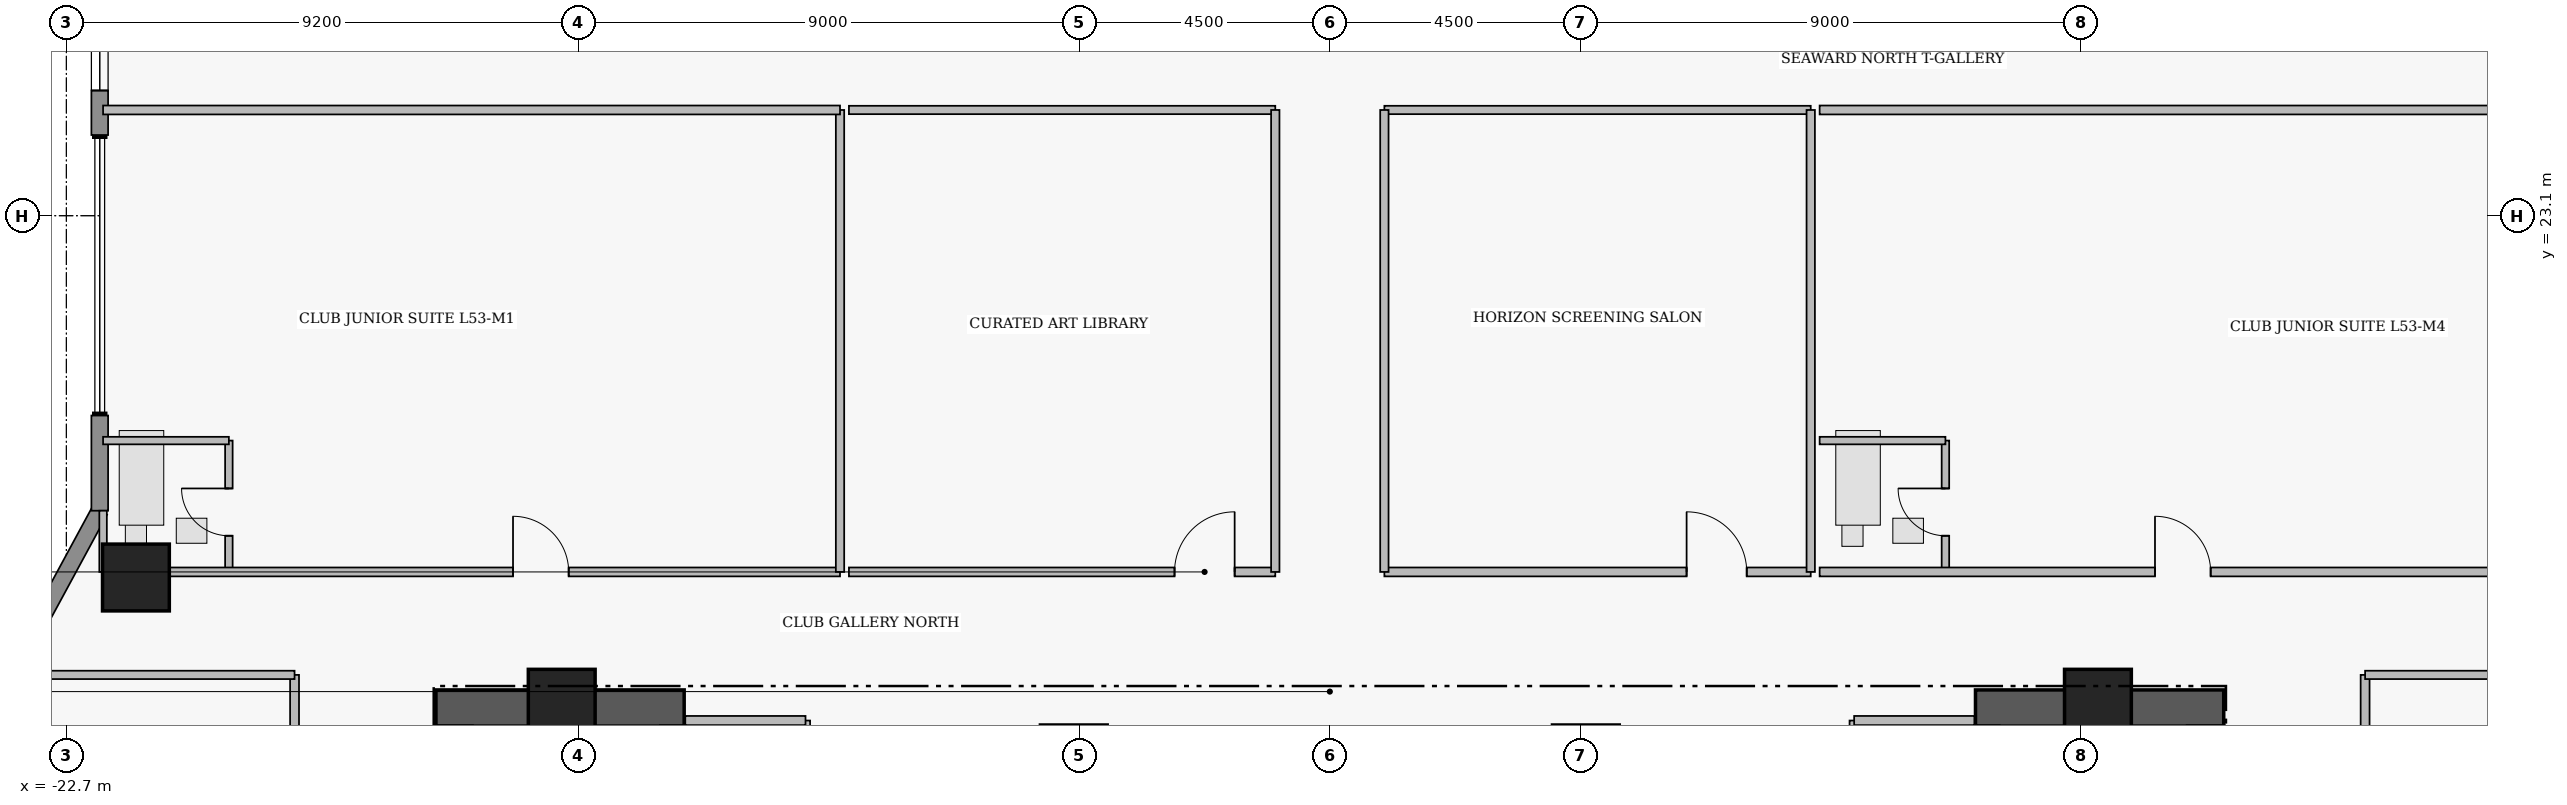
"""IFC4 building model, lengths in metres.
Left out: names, types, materials, properties, quantities, classifications, styles, units other than length and angle.
Written with IfcOpenShell. Run it as: python <this file> out.ifc"""

import sys

from ifc_helpers import new_model, si_unit, direction, frame, frame_2d, origin, origin_2d, place, context, subcontext, project, spatial, rectangle, extrude, element, fill, save


model = new_model("IFC4")
c1 = context("Model", 3, precision=1e-05, world=origin(), true_north=direction((0.0, 1.0)))
c2 = subcontext(c1, "Body", "Model", "MODEL_VIEW")
j1 = project(units=[si_unit("LENGTHUNIT", "METRE"), si_unit("PLANEANGLEUNIT", "RADIAN")], contexts=[c1])
p1 = place(None, origin())
s1 = spatial("IfcSite", under=j1, at=p1, CompositionType="ELEMENT")
p2 = place(p1, origin())
s2 = spatial("IfcBuilding", under=s1, at=p2, CompositionType="ELEMENT")
p3 = place(p2, frame((0.0, 0.0, 211.15)))
s3 = spatial("IfcBuildingStorey", under=s2, at=p3, CompositionType="ELEMENT", Elevation=211.15)
for number, where, z_axis, x_axis in (
    (1, (-16.06, 14.255, 0.0), (0.0, 0.0, 1.0), (1.0, 0.0, 0.0)),
    (2, (11.6, 14.255, 0.0), (0.0, 0.0, 1.0), (1.0, 0.0, 0.0)),
):
    element("IfcWall", number, at=place(p3, frame(where, z_axis=z_axis, x_axis=x_axis)), inside=s3, PredefinedType="SHEAR", context=c2, shape_type="SweptSolid", body=[
        extrude(rectangle(XDim=4.46, YDim=0.65, at=frame_2d((2.23, 0.0))), origin(), (0.0, 0.0, 1.0), 3.56),
    ])
for number, where, z_axis, x_axis in (
    (3, (-13.8, 14.35, 0.0), (0.0, 0.0, 1.0), (1.0, 0.0, 0.0)),
    (4, (-4.6, 13.35, 0.0), (0.0, 0.0, 1.0), (1.0, 0.0, 0.0)),
    (5, (4.6, 13.35, 0.0), (0.0, 0.0, 1.0), (1.0, 0.0, 0.0)),
    (6, (13.8, 14.35, 0.0), (0.0, 0.0, 1.0), (1.0, 0.0, 0.0)),
    (7, (-21.45, 16.6, 0.0), (0.0, 0.0, 1.0), (1.0, 0.0, 0.0)),
):
    element("IfcColumn", number, at=place(p3, frame(where, z_axis=z_axis, x_axis=x_axis)), inside=s3, PredefinedType="COLUMN", context=c2, shape_type="SweptSolid", body=[
        extrude(rectangle(XDim=1.2, YDim=1.2, at=origin_2d()), origin(), (0.0, 0.0, 1.0), 3.75),
    ])
p4 = place(p3, frame((-24.7, 13.0, 0.0), z_axis=(0.0, 0.0, 1.0), x_axis=(0.476258655584, 0.879305233114, 0.0)))
e8 = element("IfcWall", 8, at=p4, inside=s3, PredefinedType="STANDARD", context=c2, shape_type="SweptSolid", body=[
    extrude(rectangle(XDim=5.459, YDim=0.3, at=frame_2d((2.729, 0.0))), origin(), (0.0, 0.0, 1.0), 3.53),
])
p5 = place(p3, frame((-22.1, 17.8, 0.0), z_axis=(0.0, 0.0, 1.0), x_axis=(0.0, 1.0, 0.0)))
e9 = element("IfcWall", 9, at=p5, inside=s3, PredefinedType="STANDARD", context=c2, shape_type="SweptSolid", body=[
    extrude(rectangle(XDim=1.71, YDim=0.3, at=frame_2d((0.855, 0.0))), origin(), (0.0, 0.0, 1.0), 3.53),
])
p6 = place(p3, frame((-22.1, 24.55, 0.0), z_axis=(0.0, 0.0, 1.0), x_axis=(0.0, 1.0, 0.0)))
e10 = element("IfcWall", 10, at=p6, inside=s3, PredefinedType="STANDARD", context=c2, shape_type="SweptSolid", body=[
    extrude(rectangle(XDim=5.65, YDim=0.3, at=frame_2d((2.825, 0.0))), origin(), (0.0, 0.0, 1.0), 3.53),
])
p7 = place(p6, frame((0.8, 0.0, 0.95)))
e11 = element("IfcOpeningElement", 11, at=p7, cuts=e10, PredefinedType="OPENING", context=c2, shape_type="SweptSolid", body=[
    extrude(rectangle(XDim=1.15, YDim=1.55, at=frame_2d((0.575, 0.775))), frame((0.0, 0.16, 0.0), z_axis=(0.0, -1.0, 0.0), x_axis=(1.0, 0.0, 0.0)), (0.0, 0.0, 1.0), 0.32),
])
p8 = place(p6, frame((2.905, 0.0, 0.95)))
e12 = element("IfcOpeningElement", 12, at=p8, cuts=e10, PredefinedType="OPENING", context=c2, shape_type="SweptSolid", body=[
    extrude(rectangle(XDim=1.15, YDim=1.55, at=frame_2d((0.575, 0.775))), frame((0.0, 0.16, 0.0), z_axis=(0.0, -1.0, 0.0), x_axis=(1.0, 0.0, 0.0)), (0.0, 0.0, 1.0), 0.32),
])
p9 = place(p3, frame((-19.78, 16.7, 0.0), z_axis=(0.0, 0.0, 1.0), x_axis=(0.0, 1.0, 0.0)))
e13 = element("IfcWall", 13, at=p9, inside=s3, PredefinedType="PLUMBINGWALL", context=c2, shape_type="SweptSolid", body=[
    extrude(rectangle(XDim=2.36, YDim=0.135, at=frame_2d((1.18, 0.0))), origin(), (0.0, 0.0, 1.0), 3.53),
])
p10 = place(p9, frame((0.65, 0.0, 0.0)))
e14 = element("IfcOpeningElement", 14, at=p10, cuts=e13, PredefinedType="OPENING", context=c2, shape_type="SweptSolid", body=[
    extrude(rectangle(XDim=0.85, YDim=2.1, at=frame_2d((0.425, 1.05))), frame((0.0, 0.077, 0.0), z_axis=(0.0, -1.0, 0.0), x_axis=(1.0, 0.0, 0.0)), (0.0, 0.0, 1.0), 0.155),
])
p11 = place(p3, frame((-22.04, 16.7, 0.0), z_axis=(0.0, 0.0, 1.0), x_axis=(1.0, 0.0, 0.0)))
e15 = element("IfcWall", 15, at=p11, inside=s3, PredefinedType="PARTITIONING", context=c2, shape_type="SweptSolid", body=[
    extrude(rectangle(XDim=13.24, YDim=0.16, at=frame_2d((6.62, 0.0))), origin(), (0.0, 0.0, 1.0), 3.124),
])
p12 = place(p11, frame((7.365, 0.0, 0.0)))
e16 = element("IfcOpeningElement", 16, at=p12, cuts=e15, PredefinedType="OPENING", context=c2, shape_type="SweptSolid", body=[
    extrude(rectangle(XDim=1.0, YDim=2.15, at=frame_2d((0.5, 1.075))), frame((0.0, 0.09, 0.0), z_axis=(0.0, -1.0, 0.0), x_axis=(1.0, 0.0, 0.0)), (0.0, 0.0, 1.0), 0.18),
])
p13 = place(p3, frame((-8.64, 16.7, 0.0), z_axis=(0.0, 0.0, 1.0), x_axis=(1.0, 0.0, 0.0)))
e17 = element("IfcWall", 17, at=p13, inside=s3, PredefinedType="PARTITIONING", context=c2, shape_type="SweptSolid", body=[
    extrude(rectangle(XDim=7.66, YDim=0.16, at=frame_2d((3.83, 0.0))), origin(), (0.0, 0.0, 1.0), 3.124),
])
p14 = place(p13, frame((5.85, 0.0, 0.0)))
e18 = element("IfcOpeningElement", 18, at=p14, cuts=e17, PredefinedType="OPENING", context=c2, shape_type="SweptSolid", body=[
    extrude(rectangle(XDim=1.08, YDim=2.18, at=frame_2d((0.54, 1.09))), frame((0.0, 0.09, 0.0), z_axis=(0.0, -1.0, 0.0), x_axis=(1.0, 0.0, 0.0)), (0.0, 0.0, 1.0), 0.18),
])
p15 = place(p3, frame((0.98, 16.7, 0.0), z_axis=(0.0, 0.0, 1.0), x_axis=(1.0, 0.0, 0.0)))
e19 = element("IfcWall", 19, at=p15, inside=s3, PredefinedType="PARTITIONING", context=c2, shape_type="SweptSolid", body=[
    extrude(rectangle(XDim=7.66, YDim=0.16, at=frame_2d((3.83, 0.0))), origin(), (0.0, 0.0, 1.0), 3.124),
])
p16 = place(p15, frame((5.43, 0.0, 0.0)))
e20 = element("IfcOpeningElement", 20, at=p16, cuts=e19, PredefinedType="OPENING", context=c2, shape_type="SweptSolid", body=[
    extrude(rectangle(XDim=1.08, YDim=2.18, at=frame_2d((0.54, 1.09))), frame((0.0, 0.09, 0.0), z_axis=(0.0, -1.0, 0.0), x_axis=(1.0, 0.0, 0.0)), (0.0, 0.0, 1.0), 0.18),
])
p17 = place(p3, frame((11.06, 16.7, 0.0), z_axis=(0.0, 0.0, 1.0), x_axis=(0.0, 1.0, 0.0)))
e21 = element("IfcWall", 21, at=p17, inside=s3, PredefinedType="PLUMBINGWALL", context=c2, shape_type="SweptSolid", body=[
    extrude(rectangle(XDim=2.36, YDim=0.135, at=frame_2d((1.18, 0.0))), origin(), (0.0, 0.0, 1.0), 3.53),
])
p18 = place(p17, frame((0.65, 0.0, 0.0)))
e22 = element("IfcOpeningElement", 22, at=p18, cuts=e21, PredefinedType="OPENING", context=c2, shape_type="SweptSolid", body=[
    extrude(rectangle(XDim=0.85, YDim=2.1, at=frame_2d((0.425, 1.05))), frame((0.0, 0.077, 0.0), z_axis=(0.0, -1.0, 0.0), x_axis=(1.0, 0.0, 0.0)), (0.0, 0.0, 1.0), 0.155),
])
p19 = place(p3, frame((8.8, 16.7, 0.0), z_axis=(0.0, 0.0, 1.0), x_axis=(1.0, 0.0, 0.0)))
e23 = element("IfcWall", 23, at=p19, inside=s3, PredefinedType="PARTITIONING", context=c2, shape_type="SweptSolid", body=[
    extrude(rectangle(XDim=13.24, YDim=0.16, at=frame_2d((6.62, 0.0))), origin(), (0.0, 0.0, 1.0), 3.124),
])
p20 = place(p19, frame((6.025, 0.0, 0.0)))
e24 = element("IfcOpeningElement", 24, at=p20, cuts=e23, PredefinedType="OPENING", context=c2, shape_type="SweptSolid", body=[
    extrude(rectangle(XDim=1.0, YDim=2.15, at=frame_2d((0.5, 1.075))), frame((0.0, 0.09, 0.0), z_axis=(0.0, -1.0, 0.0), x_axis=(1.0, 0.0, 0.0)), (0.0, 0.0, 1.0), 0.18),
])
p21 = place(p3, frame((18.6, 6.91, 0.0), z_axis=(0.0, 0.0, 1.0), x_axis=(0.0, 1.0, 0.0)))
e25 = element("IfcWall", 25, at=p21, inside=s3, PredefinedType="PARTITIONING", context=c2, shape_type="SweptSolid", body=[
    extrude(rectangle(XDim=7.94, YDim=0.16, at=frame_2d((3.97, 0.0))), origin(), (0.0, 0.0, 1.0), 3.53),
])
p22 = place(p21, frame((3.51, 0.0, 0.0)))
e26 = element("IfcOpeningElement", 26, at=p22, cuts=e25, PredefinedType="OPENING", context=c2, shape_type="SweptSolid", body=[
    extrude(rectangle(XDim=0.92, YDim=2.12, at=frame_2d((0.46, 1.06))), frame((0.0, 0.09, 0.0), z_axis=(0.0, -1.0, 0.0), x_axis=(1.0, 0.0, 0.0)), (0.0, 0.0, 1.0), 0.18),
])
p23 = place(p3, frame((-18.6, 1.55, 0.0), z_axis=(0.0, 0.0, 1.0), x_axis=(0.0, 1.0, 0.0)))
e27 = element("IfcWall", 27, at=p23, inside=s3, PredefinedType="PARTITIONING", context=c2, shape_type="SweptSolid", body=[
    extrude(rectangle(XDim=13.3, YDim=0.16, at=frame_2d((6.65, 0.0))), origin(), (0.0, 0.0, 1.0), 3.53),
])
p24 = place(p23, frame((6.175, 0.0, 0.0)))
e28 = element("IfcOpeningElement", 28, at=p24, cuts=e27, PredefinedType="OPENING", context=c2, shape_type="SweptSolid", body=[
    extrude(rectangle(XDim=0.95, YDim=2.15, at=frame_2d((0.475, 1.075))), frame((0.0, 0.09, 0.0), z_axis=(0.0, -1.0, 0.0), x_axis=(1.0, 0.0, 0.0)), (0.0, 0.0, 1.0), 0.18),
])
p25 = place(p3, frame((-9.42, 11.07, 0.0), z_axis=(0.0, 0.0, 1.0), x_axis=(0.0, 1.0, 0.0)))
e29 = element("IfcWall", 29, at=p25, inside=s3, PredefinedType="PARTITIONING", context=c2, shape_type="SweptSolid", body=[
    extrude(rectangle(XDim=2.96, YDim=0.165, at=frame_2d((1.48, 0.0))), origin(), (0.0, 0.0, 1.0), 3.53),
])
p26 = place(p3, frame((-11.58, 14.03, 0.0), z_axis=(0.0, 0.0, 1.0), x_axis=(1.0, 0.0, 0.0)))
e30 = element("IfcWall", 30, at=p26, inside=s3, PredefinedType="PARTITIONING", context=c2, shape_type="SweptSolid", body=[
    extrude(rectangle(XDim=2.16, YDim=0.165, at=frame_2d((1.08, 0.0))), origin(), (0.0, 0.0, 1.0), 3.53),
])
p27 = place(p3, frame((9.42, 11.07, 0.0), z_axis=(0.0, 0.0, 1.0), x_axis=(0.0, 1.0, 0.0)))
e31 = element("IfcWall", 31, at=p27, inside=s3, PredefinedType="PARTITIONING", context=c2, shape_type="SweptSolid", body=[
    extrude(rectangle(XDim=2.96, YDim=0.165, at=frame_2d((1.48, 0.0))), origin(), (0.0, 0.0, 1.0), 3.53),
])
p28 = place(p3, frame((9.42, 14.03, 0.0), z_axis=(0.0, 0.0, 1.0), x_axis=(1.0, 0.0, 0.0)))
e32 = element("IfcWall", 32, at=p28, inside=s3, PredefinedType="PARTITIONING", context=c2, shape_type="SweptSolid", body=[
    extrude(rectangle(XDim=2.16, YDim=0.165, at=frame_2d((1.08, 0.0))), origin(), (0.0, 0.0, 1.0), 3.53),
])
p29 = place(p3, frame((-22.04, 19.06, 0.0), z_axis=(0.0, 0.0, 1.0), x_axis=(1.0, 0.0, 0.0)))
e33 = element("IfcWall", 33, at=p29, inside=s3, PredefinedType="PLUMBINGWALL", context=c2, shape_type="SweptSolid", body=[
    extrude(rectangle(XDim=2.26, YDim=0.135, at=frame_2d((1.13, 0.0))), origin(), (0.0, 0.0, 1.0), 3.53),
])
p30 = place(p3, frame((-22.04, 16.7, 0.0), z_axis=(0.0, 0.0, 1.0), x_axis=(0.0, 1.0, 0.0)))
e34 = element("IfcWall", 34, at=p30, inside=s3, PredefinedType="PLUMBINGWALL", context=c2, shape_type="SweptSolid", body=[
    extrude(rectangle(XDim=1.1, YDim=0.135, at=frame_2d((0.55, 0.0))), origin(), (0.0, 0.0, 1.0), 3.53),
])
p31 = place(p3, frame((-8.8, 16.7, 0.0), z_axis=(0.0, 0.0, 1.0), x_axis=(0.0, 1.0, 0.0)))
e35 = element("IfcWall", 35, at=p31, inside=s3, PredefinedType="PARTITIONING", context=c2, shape_type="SweptSolid", body=[
    extrude(rectangle(XDim=8.3, YDim=0.15, at=frame_2d((4.15, 0.0))), origin(), (0.0, 0.0, 1.0), 3.53),
])
p32 = place(p3, frame((-22.04, 25.0, 0.0), z_axis=(0.0, 0.0, 1.0), x_axis=(1.0, 0.0, 0.0)))
e36 = element("IfcWall", 36, at=p32, inside=s3, PredefinedType="PARTITIONING", context=c2, shape_type="SweptSolid", body=[
    extrude(rectangle(XDim=13.24, YDim=0.16, at=frame_2d((6.62, 0.0))), origin(), (0.0, 0.0, 1.0), 3.124),
])
p33 = place(p3, frame((-8.64, 25.0, 0.0), z_axis=(0.0, 0.0, 1.0), x_axis=(1.0, 0.0, 0.0)))
e37 = element("IfcWall", 37, at=p33, inside=s3, PredefinedType="PARTITIONING", context=c2, shape_type="SweptSolid", body=[
    extrude(rectangle(XDim=7.66, YDim=0.15, at=frame_2d((3.83, 0.0))), origin(), (0.0, 0.0, 1.0), 3.124),
])
p34 = place(p3, frame((-0.98, 16.7, 0.0), z_axis=(0.0, 0.0, 1.0), x_axis=(0.0, 1.0, 0.0)))
e38 = element("IfcWall", 38, at=p34, inside=s3, PredefinedType="PARTITIONING", context=c2, shape_type="SweptSolid", body=[
    extrude(rectangle(XDim=8.3, YDim=0.15, at=frame_2d((4.15, 0.0))), origin(), (0.0, 0.0, 1.0), 3.53),
])
p35 = place(p3, frame((0.98, 25.0, 0.0), z_axis=(0.0, 0.0, 1.0), x_axis=(1.0, 0.0, 0.0)))
e39 = element("IfcWall", 39, at=p35, inside=s3, PredefinedType="PARTITIONING", context=c2, shape_type="SweptSolid", body=[
    extrude(rectangle(XDim=7.66, YDim=0.15, at=frame_2d((3.83, 0.0))), origin(), (0.0, 0.0, 1.0), 3.124),
])
for number, where, z_axis, x_axis in (
    (40, (0.98, 16.7, 0.0), (0.0, 0.0, 1.0), (0.0, 1.0, 0.0)),
    (41, (8.64, 16.7, 0.0), (0.0, 0.0, 1.0), (0.0, 1.0, 0.0)),
):
    element("IfcWall", number, at=place(p3, frame(where, z_axis=z_axis, x_axis=x_axis)), inside=s3, PredefinedType="PARTITIONING", context=c2, shape_type="SweptSolid", body=[
        extrude(rectangle(XDim=8.3, YDim=0.15, at=frame_2d((4.15, 0.0))), origin(), (0.0, 0.0, 1.0), 3.53),
    ])
p36 = place(p3, frame((8.8, 19.06, 0.0), z_axis=(0.0, 0.0, 1.0), x_axis=(1.0, 0.0, 0.0)))
e42 = element("IfcWall", 42, at=p36, inside=s3, PredefinedType="PLUMBINGWALL", context=c2, shape_type="SweptSolid", body=[
    extrude(rectangle(XDim=2.26, YDim=0.135, at=frame_2d((1.13, 0.0))), origin(), (0.0, 0.0, 1.0), 3.124),
])
p37 = place(p3, frame((8.8, 25.0, 0.0), z_axis=(0.0, 0.0, 1.0), x_axis=(1.0, 0.0, 0.0)))
e43 = element("IfcWall", 43, at=p37, inside=s3, PredefinedType="PARTITIONING", context=c2, shape_type="SweptSolid", body=[
    extrude(rectangle(XDim=13.24, YDim=0.16, at=frame_2d((6.62, 0.0))), origin(), (0.0, 0.0, 1.0), 3.124),
])
for number, where, z_axis, x_axis in (
    (44, (18.6, 14.85, 0.0), (0.0, 0.0, 1.0), (1.0, 0.0, 0.0)),
    (45, (-23.638, 14.85, 0.0), (0.0, 0.0, 1.0), (1.0, 0.0, 0.0)),
):
    element("IfcWall", number, at=place(p3, frame(where, z_axis=z_axis, x_axis=x_axis)), inside=s3, PredefinedType="PARTITIONING", context=c2, shape_type="SweptSolid", body=[
        extrude(rectangle(XDim=5.038, YDim=0.15, at=frame_2d((2.519, 0.0))), origin(), (0.0, 0.0, 1.0), 3.53),
    ])
p38 = place(p7, origin())
e46 = element("IfcWindow", 46, at=p38, inside=s3, PartitioningType="SINGLE_PANEL", PredefinedType="WINDOW", context=c2, shape_type="SweptSolid", body=[
    extrude(rectangle(XDim=1.15, YDim=1.55, at=frame_2d((0.575, 0.775))), frame((0.0, 0.03, 0.0), z_axis=(0.0, -1.0, 0.0), x_axis=(1.0, 0.0, 0.0)), (0.0, 0.0, 1.0), 0.06),
])
fill(e11, e46)
p39 = place(p10, origin())
e47 = element("IfcDoor", 47, at=p39, inside=s3, OperationType="SINGLE_SWING_RIGHT", PredefinedType="DOOR", context=c2, shape_type="SweptSolid", body=[
    extrude(rectangle(XDim=0.85, YDim=2.1, at=frame_2d((0.425, 1.05))), frame((0.0, 0.025, 0.0), z_axis=(0.0, -1.0, 0.0), x_axis=(1.0, 0.0, 0.0)), (0.0, 0.0, 1.0), 0.05),
])
fill(e14, e47)
p40 = place(p12, origin())
e48 = element("IfcDoor", 48, at=p40, inside=s3, OperationType="SINGLE_SWING_LEFT", PredefinedType="DOOR", context=c2, shape_type="SweptSolid", body=[
    extrude(rectangle(XDim=1.0, YDim=2.15, at=frame_2d((0.5, 1.075))), frame((0.0, 0.025, 0.0), z_axis=(0.0, -1.0, 0.0), x_axis=(1.0, 0.0, 0.0)), (0.0, 0.0, 1.0), 0.05),
])
fill(e16, e48)
p41 = place(p14, origin())
e49 = element("IfcDoor", 49, at=p41, inside=s3, OperationType="SINGLE_SWING_RIGHT", PredefinedType="DOOR", context=c2, shape_type="SweptSolid", body=[
    extrude(rectangle(XDim=1.08, YDim=2.18, at=frame_2d((0.54, 1.09))), frame((0.0, 0.025, 0.0), z_axis=(0.0, -1.0, 0.0), x_axis=(1.0, 0.0, 0.0)), (0.0, 0.0, 1.0), 0.05),
])
fill(e18, e49)
p42 = place(p16, origin())
e50 = element("IfcDoor", 50, at=p42, inside=s3, OperationType="SINGLE_SWING_LEFT", PredefinedType="DOOR", context=c2, shape_type="SweptSolid", body=[
    extrude(rectangle(XDim=1.08, YDim=2.18, at=frame_2d((0.54, 1.09))), frame((0.0, 0.025, 0.0), z_axis=(0.0, -1.0, 0.0), x_axis=(1.0, 0.0, 0.0)), (0.0, 0.0, 1.0), 0.05),
])
fill(e20, e50)
p43 = place(p18, origin())
e51 = element("IfcDoor", 51, at=p43, inside=s3, OperationType="SINGLE_SWING_RIGHT", PredefinedType="DOOR", context=c2, shape_type="SweptSolid", body=[
    extrude(rectangle(XDim=0.85, YDim=2.1, at=frame_2d((0.425, 1.05))), frame((0.0, 0.025, 0.0), z_axis=(0.0, -1.0, 0.0), x_axis=(1.0, 0.0, 0.0)), (0.0, 0.0, 1.0), 0.05),
])
fill(e22, e51)
p44 = place(p20, origin())
e52 = element("IfcDoor", 52, at=p44, inside=s3, OperationType="SINGLE_SWING_LEFT", PredefinedType="DOOR", context=c2, shape_type="SweptSolid", body=[
    extrude(rectangle(XDim=1.0, YDim=2.15, at=frame_2d((0.5, 1.075))), frame((0.0, 0.025, 0.0), z_axis=(0.0, -1.0, 0.0), x_axis=(1.0, 0.0, 0.0)), (0.0, 0.0, 1.0), 0.05),
])
fill(e24, e52)
save(model, sys.argv[1])
